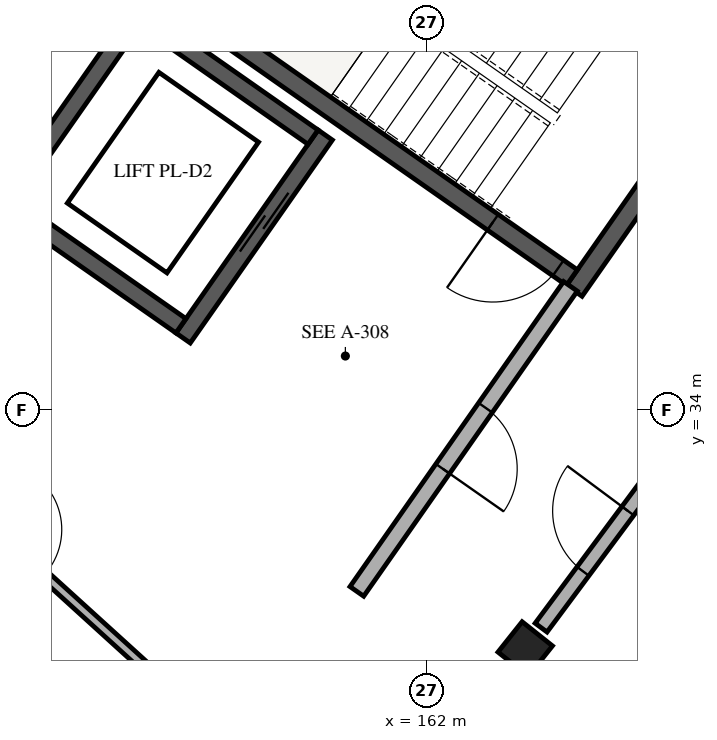
"""IFC4 building model, lengths in metres.
Left out: names, types, materials, properties, quantities, classifications, styles, units other than length and angle.
Written with IfcOpenShell. Run it as: python <this file> out.ifc"""

import sys

from ifc_helpers import new_model, si_unit, direction, frame, frame_2d, origin, origin_2d, place, context, subcontext, project, spatial, rectangle, extrude, element, fill, save


model = new_model("IFC4")
c1 = context("Model", 3, precision=1e-05, world=origin(), true_north=direction((0.0, 1.0)))
c2 = subcontext(c1, "Body", "Model", "MODEL_VIEW")
j1 = project(units=[si_unit("LENGTHUNIT", "METRE"), si_unit("PLANEANGLEUNIT", "RADIAN")], contexts=[c1])
p1 = place(None, origin())
s1 = spatial("IfcSite", under=j1, at=p1, CompositionType="ELEMENT")
p2 = place(p1, origin())
s2 = spatial("IfcBuilding", under=s1, at=p2, CompositionType="ELEMENT")
p3 = place(p2, frame((0.0, 0.0, 25.64)))
s3 = spatial("IfcBuildingStorey", under=s2, at=p3, CompositionType="ELEMENT", Elevation=25.64)
p4 = place(p3, frame((165.733, 38.336, 0.0), z_axis=(0.0, 0.0, 1.0), x_axis=(-0.819153711596, 0.573574055182, 0.0)))
e1 = element("IfcWall", 1, at=p4, inside=s3, PredefinedType="SHEAR", context=c2, shape_type="SweptSolid", body=[
    extrude(rectangle(XDim=6.6, YDim=0.25, at=frame_2d((3.3, 0.0))), origin(), (0.0, 0.0, 1.0), 3.11),
])
p5 = place(p3, frame((165.907, 38.366, 0.0), z_axis=(0.0, 0.0, 1.0), x_axis=(-0.573582112484, -0.819148069789, 0.0)))
e2 = element("IfcWall", 2, at=p5, inside=s3, PredefinedType="SHEAR", context=c2, shape_type="SweptSolid", body=[
    extrude(rectangle(XDim=3.42, YDim=0.25, at=frame_2d((1.71, 0.0))), origin(), (0.0, 0.0, 1.0), 3.11),
])
p6 = place(p3, frame((163.914, 35.739, 0.0), z_axis=(0.0, 0.0, 1.0), x_axis=(-0.819153711596, 0.573574055182, 0.0)))
e3 = element("IfcWall", 3, at=p6, inside=s3, PredefinedType="SHEAR", context=c2, shape_type="SweptSolid", body=[
    extrude(rectangle(XDim=6.6, YDim=0.25, at=frame_2d((3.3, 0.0))), origin(), (0.0, 0.0, 1.0), 3.11),
])
p7 = place(p6, frame((0.22, 0.0, 0.0)))
e4 = element("IfcOpeningElement", 4, at=p7, cuts=e3, PredefinedType="OPENING", context=c2, shape_type="SweptSolid", body=[
    extrude(rectangle(XDim=1.05, YDim=2.15, at=frame_2d((0.525, 1.075))), frame((0.0, 0.135, 0.0), z_axis=(0.0, -1.0, 0.0), x_axis=(1.0, 0.0, 0.0)), (0.0, 0.0, 1.0), 0.27),
])
p8 = place(p3, frame((160.668, 37.615, 0.0), z_axis=(0.0, 0.0, 1.0), x_axis=(-0.573582966431, -0.819147471839, 0.0)))
e5 = element("IfcWall", 5, at=p8, inside=s3, PredefinedType="SHEAR", context=c2, shape_type="SweptSolid", body=[
    extrude(rectangle(XDim=3.26, YDim=0.23, at=frame_2d((1.63, 0.0))), origin(), (0.0, 0.0, 1.0), 3.11),
])
p9 = place(p8, frame((0.9, 0.0, 0.0)))
e6 = element("IfcOpeningElement", 6, at=p9, cuts=e5, PredefinedType="OPENING", context=c2, shape_type="SweptSolid", body=[
    extrude(rectangle(XDim=1.0, YDim=2.15, at=frame_2d((0.5, 1.075))), frame((0.0, 0.125, 0.0), z_axis=(0.0, -1.0, 0.0), x_axis=(1.0, 0.0, 0.0)), (0.0, 0.0, 1.0), 0.25),
])
p10 = place(p3, frame((158.268, 39.296, 0.0), z_axis=(0.0, 0.0, 1.0), x_axis=(-0.573582966431, -0.819147471839, 0.0)))
e7 = element("IfcWall", 7, at=p10, inside=s3, PredefinedType="SHEAR", context=c2, shape_type="SweptSolid", body=[
    extrude(rectangle(XDim=3.26, YDim=0.23, at=frame_2d((1.63, 0.0))), origin(), (0.0, 0.0, 1.0), 3.11),
])
p11 = place(p3, frame((160.508, 37.587, 0.0), z_axis=(0.0, 0.0, 1.0), x_axis=(-0.819189439894, 0.573523026186, 0.0)))
e8 = element("IfcWall", 8, at=p11, inside=s3, PredefinedType="SHEAR", context=c2, shape_type="SweptSolid", body=[
    extrude(rectangle(XDim=2.7, YDim=0.23, at=frame_2d((1.35, 0.0))), origin(), (0.0, 0.0, 1.0), 3.11),
])
p12 = place(p3, frame((158.77, 35.105, 0.0), z_axis=(0.0, 0.0, 1.0), x_axis=(-0.819117209968, 0.573626181702, 0.0)))
e9 = element("IfcWall", 9, at=p12, inside=s3, PredefinedType="SHEAR", context=c2, shape_type="SweptSolid", body=[
    extrude(rectangle(XDim=2.7, YDim=0.23, at=frame_2d((1.35, 0.0))), origin(), (0.0, 0.0, 1.0), 3.11),
])
p13 = place(p3, frame((163.3, 30.853, 0.0), z_axis=(0.0, 0.0, 1.0), x_axis=(0.782608156852, -0.622514636638, 0.0)))
e10 = element("IfcColumn", 10, at=p13, inside=s3, PredefinedType="COLUMN", context=c2, shape_type="SweptSolid", body=[
    extrude(rectangle(XDim=0.51, YDim=0.51, at=origin_2d()), origin(), (0.0, 0.0, 1.0), 3.11),
])
p14 = place(p3, frame((163.895, 35.624, 0.0), z_axis=(0.0, 0.0, 1.0), x_axis=(-0.573572687386, -0.819154669329, 0.0)))
e11 = element("IfcWall", 11, at=p14, inside=s3, PredefinedType="PARTITIONING", context=c2, shape_type="SweptSolid", body=[
    extrude(rectangle(XDim=4.9, YDim=0.22, at=frame_2d((2.45, 0.0))), origin(), (0.0, 0.0, 1.0), 2.34),
])
p15 = place(p14, frame((1.95, 0.0, 0.0)))
e12 = element("IfcOpeningElement", 12, at=p15, cuts=e11, PredefinedType="OPENING", context=c2, shape_type="SweptSolid", body=[
    extrude(rectangle(XDim=0.98, YDim=2.14, at=frame_2d((0.49, 1.07))), frame((0.0, 0.12, 0.0), z_axis=(0.0, -1.0, 0.0), x_axis=(1.0, 0.0, 0.0)), (0.0, 0.0, 1.0), 0.24),
])
p16 = place(p3, frame((154.199, 34.344, 0.0), z_axis=(0.0, 0.0, 1.0), x_axis=(0.74023124711, -0.672352363573, 0.0)))
e13 = element("IfcWall", 13, at=p16, inside=s3, PredefinedType="PARTITIONING", context=c2, shape_type="SweptSolid", body=[
    extrude(rectangle(XDim=6.6, YDim=0.125, at=frame_2d((3.3, 0.0))), origin(), (0.0, 0.0, 1.0), 2.37),
])
p17 = place(p16, frame((2.855, 0.0, 0.0)))
e14 = element("IfcOpeningElement", 14, at=p17, cuts=e13, PredefinedType="OPENING", context=c2, shape_type="SweptSolid", body=[
    extrude(rectangle(XDim=0.89, YDim=2.1, at=frame_2d((0.445, 1.05))), frame((0.0, 0.073, 0.0), z_axis=(0.0, -1.0, 0.0), x_axis=(1.0, 0.0, 0.0)), (0.0, 0.0, 1.0), 0.145),
])
p18 = place(p3, frame((163.509, 31.134, 0.0), z_axis=(0.0, 0.0, 1.0), x_axis=(0.596552136601, 0.802574325727, 0.0)))
e15 = element("IfcWall", 15, at=p18, inside=s3, PredefinedType="PARTITIONING", context=c2, shape_type="SweptSolid", body=[
    extrude(rectangle(XDim=2.837, YDim=0.195, at=frame_2d((1.418, 0.0))), origin(), (0.0, 0.0, 1.0), 2.37),
])
p19 = place(p18, frame((0.924, 0.0, 0.0)))
e16 = element("IfcOpeningElement", 16, at=p19, cuts=e15, PredefinedType="OPENING", context=c2, shape_type="SweptSolid", body=[
    extrude(rectangle(XDim=0.99, YDim=2.16, at=frame_2d((0.495, 1.08))), frame((0.0, 0.107, 0.0), z_axis=(0.0, -1.0, 0.0), x_axis=(1.0, 0.0, 0.0)), (0.0, 0.0, 1.0), 0.215),
])
p20 = place(p7, origin())
e17 = element("IfcDoor", 17, at=p20, inside=s3, OperationType="SINGLE_SWING_RIGHT", PredefinedType="DOOR", context=c2, shape_type="SweptSolid", body=[
    extrude(rectangle(XDim=1.05, YDim=2.15, at=frame_2d((0.525, 1.075))), frame((0.0, 0.025, 0.0), z_axis=(0.0, -1.0, 0.0), x_axis=(1.0, 0.0, 0.0)), (0.0, 0.0, 1.0), 0.05),
])
fill(e4, e17)
p21 = place(p9, origin())
e18 = element("IfcDoor", 18, at=p21, inside=s3, OperationType="DOUBLE_DOOR_SLIDING", PredefinedType="DOOR", context=c2, shape_type="SweptSolid", body=[
    extrude(rectangle(XDim=1.0, YDim=2.15, at=frame_2d((0.5, 1.075))), frame((0.0, 0.025, 0.0), z_axis=(0.0, -1.0, 0.0), x_axis=(1.0, 0.0, 0.0)), (0.0, 0.0, 1.0), 0.05),
])
fill(e6, e18)
p22 = place(p15, origin())
e19 = element("IfcDoor", 19, at=p22, inside=s3, OperationType="SINGLE_SWING_RIGHT", PredefinedType="DOOR", context=c2, shape_type="SweptSolid", body=[
    extrude(rectangle(XDim=0.98, YDim=2.14, at=frame_2d((0.49, 1.07))), frame((0.0, 0.025, 0.0), z_axis=(0.0, -1.0, 0.0), x_axis=(1.0, 0.0, 0.0)), (0.0, 0.0, 1.0), 0.05),
])
fill(e12, e19)
p23 = place(p19, origin())
e20 = element("IfcDoor", 20, at=p23, inside=s3, OperationType="SINGLE_SWING_RIGHT", PredefinedType="DOOR", context=c2, shape_type="SweptSolid", body=[
    extrude(rectangle(XDim=0.99, YDim=2.16, at=frame_2d((0.495, 1.08))), frame((0.0, 0.025, 0.0), z_axis=(0.0, -1.0, 0.0), x_axis=(1.0, 0.0, 0.0)), (0.0, 0.0, 1.0), 0.05),
])
fill(e16, e20)
save(model, sys.argv[1])
